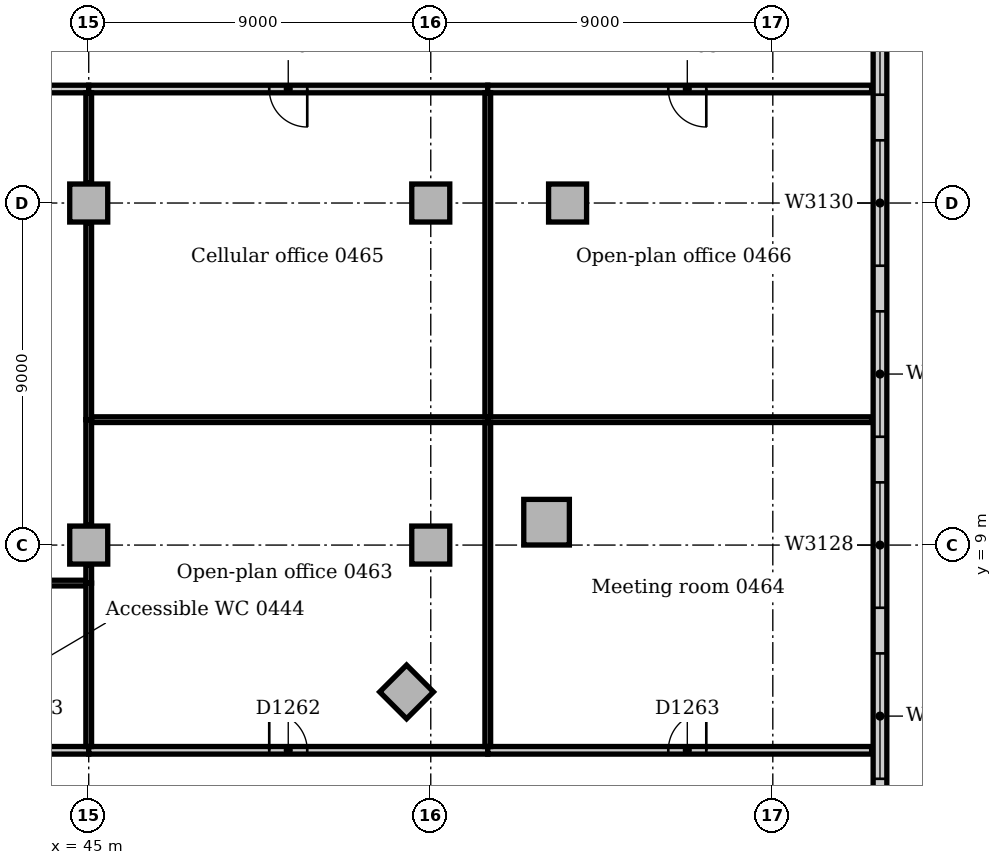
"""IFC4 building model, lengths in metres.
Left out: names, types, materials, properties, quantities, classifications, styles, units other than length and angle.
Written with IfcOpenShell. Run it as: python <this file> out.ifc"""

import sys

from ifc_helpers import new_model, si_unit, direction, frame, frame_2d, origin, origin_2d, place, context, subcontext, project, spatial, rectangle, extrude, element, fill, save


model = new_model("IFC4")
c1 = context("Model", 3, precision=1e-05, world=origin(), true_north=direction((0.0, 1.0)))
c2 = subcontext(c1, "Body", "Model", "MODEL_VIEW")
j1 = project(units=[si_unit("LENGTHUNIT", "METRE"), si_unit("PLANEANGLEUNIT", "RADIAN")], contexts=[c1])
p1 = place(None, origin())
s1 = spatial("IfcSite", under=j1, at=p1, CompositionType="ELEMENT")
p2 = place(p1, origin())
s2 = spatial("IfcBuilding", under=s1, at=p2, CompositionType="ELEMENT")
p3 = place(p2, frame((0.0, 0.0, 21.0)))
s3 = spatial("IfcBuildingStorey", under=s2, at=p3, CompositionType="ELEMENT", Elevation=21.0)
p4 = place(p3, frame((57.047, 9.602, 0.0), z_axis=(0.0, 0.0, 1.0), x_axis=(1.0, 0.0, 0.0)))
e1 = element("IfcColumn", 1, at=p4, inside=s3, PredefinedType="COLUMN", context=c2, shape_type="SweptSolid", body=[
    extrude(rectangle(XDim=1.2, YDim=1.2, at=origin_2d()), origin(), (0.0, 0.0, 1.0), 4.85),
])
for number, where, z_axis, x_axis in (
    (2, (53.364, 5.136, 0.0), (0.0, 0.0, 1.0), (0.707, 0.707, 0.0)),
    (3, (57.6, 18.0, 0.0), (0.0, 0.0, 1.0), (1.0, 0.0, 0.0)),
    (4, (45.0, 9.0, 0.0), (0.0, 0.0, 1.0), (1.0, 0.0, 0.0)),
    (5, (45.0, 18.0, 0.0), (0.0, 0.0, 1.0), (1.0, 0.0, 0.0)),
    (6, (54.0, 9.0, 0.0), (0.0, 0.0, 1.0), (1.0, 0.0, 0.0)),
    (7, (54.0, 18.0, 0.0), (0.0, 0.0, 1.0), (1.0, 0.0, 0.0)),
):
    element("IfcColumn", number, at=place(p3, frame(where, z_axis=z_axis, x_axis=x_axis)), inside=s3, PredefinedType="COLUMN", context=c2, shape_type="SweptSolid", body=[
        extrude(rectangle(XDim=1.0, YDim=1.0, at=origin_2d()), origin(), (0.0, 0.0, 1.0), 4.85),
    ])
p5 = place(p3, frame((65.82, -9.0, 0.0), z_axis=(0.0, 0.0, 1.0), x_axis=(0.0, 1.0, 0.0)))
e8 = element("IfcWall", 8, at=p5, inside=s3, PredefinedType="STANDARD", context=c2, shape_type="SweptSolid", body=[
    extrude(rectangle(XDim=63.0, YDim=0.36, at=frame_2d((31.5, 0.0))), origin(), (0.0, 0.0, 1.0), 4.85),
])
p6 = place(p5, frame((2.85, 0.0, 0.9)))
e9 = element("IfcOpeningElement", 9, at=p6, cuts=e8, PredefinedType="OPENING", context=c2, shape_type="SweptSolid", body=[
    extrude(rectangle(XDim=3.3, YDim=2.4, at=frame_2d((1.65, 1.2))), frame((0.0, 0.19, 0.0), z_axis=(0.0, -1.0, 0.0), x_axis=(1.0, 0.0, 0.0)), (0.0, 0.0, 1.0), 0.38),
])
p7 = place(p5, frame((7.35, 0.0, 0.9)))
e10 = element("IfcOpeningElement", 10, at=p7, cuts=e8, PredefinedType="OPENING", context=c2, shape_type="SweptSolid", body=[
    extrude(rectangle(XDim=3.3, YDim=2.4, at=frame_2d((1.65, 1.2))), frame((0.0, 0.19, 0.0), z_axis=(0.0, -1.0, 0.0), x_axis=(1.0, 0.0, 0.0)), (0.0, 0.0, 1.0), 0.38),
])
p8 = place(p5, frame((11.85, 0.0, 0.9)))
e11 = element("IfcOpeningElement", 11, at=p8, cuts=e8, PredefinedType="OPENING", context=c2, shape_type="SweptSolid", body=[
    extrude(rectangle(XDim=3.3, YDim=2.4, at=frame_2d((1.65, 1.2))), frame((0.0, 0.19, 0.0), z_axis=(0.0, -1.0, 0.0), x_axis=(1.0, 0.0, 0.0)), (0.0, 0.0, 1.0), 0.38),
])
p9 = place(p5, frame((16.35, 0.0, 0.9)))
e12 = element("IfcOpeningElement", 12, at=p9, cuts=e8, PredefinedType="OPENING", context=c2, shape_type="SweptSolid", body=[
    extrude(rectangle(XDim=3.3, YDim=2.4, at=frame_2d((1.65, 1.2))), frame((0.0, 0.19, 0.0), z_axis=(0.0, -1.0, 0.0), x_axis=(1.0, 0.0, 0.0)), (0.0, 0.0, 1.0), 0.38),
])
p10 = place(p5, frame((20.85, 0.0, 0.9)))
e13 = element("IfcOpeningElement", 13, at=p10, cuts=e8, PredefinedType="OPENING", context=c2, shape_type="SweptSolid", body=[
    extrude(rectangle(XDim=3.3, YDim=2.4, at=frame_2d((1.65, 1.2))), frame((0.0, 0.19, 0.0), z_axis=(0.0, -1.0, 0.0), x_axis=(1.0, 0.0, 0.0)), (0.0, 0.0, 1.0), 0.38),
])
p11 = place(p5, frame((25.35, 0.0, 0.9)))
e14 = element("IfcOpeningElement", 14, at=p11, cuts=e8, PredefinedType="OPENING", context=c2, shape_type="SweptSolid", body=[
    extrude(rectangle(XDim=3.3, YDim=2.4, at=frame_2d((1.65, 1.2))), frame((0.0, 0.19, 0.0), z_axis=(0.0, -1.0, 0.0), x_axis=(1.0, 0.0, 0.0)), (0.0, 0.0, 1.0), 0.38),
])
p12 = place(p5, frame((29.85, 0.0, 0.9)))
e15 = element("IfcOpeningElement", 15, at=p12, cuts=e8, PredefinedType="OPENING", context=c2, shape_type="SweptSolid", body=[
    extrude(rectangle(XDim=3.3, YDim=2.4, at=frame_2d((1.65, 1.2))), frame((0.0, 0.19, 0.0), z_axis=(0.0, -1.0, 0.0), x_axis=(1.0, 0.0, 0.0)), (0.0, 0.0, 1.0), 0.38),
])
p13 = place(p5, frame((34.35, 0.0, 0.9)))
e16 = element("IfcOpeningElement", 16, at=p13, cuts=e8, PredefinedType="OPENING", context=c2, shape_type="SweptSolid", body=[
    extrude(rectangle(XDim=3.3, YDim=2.4, at=frame_2d((1.65, 1.2))), frame((0.0, 0.19, 0.0), z_axis=(0.0, -1.0, 0.0), x_axis=(1.0, 0.0, 0.0)), (0.0, 0.0, 1.0), 0.38),
])
p14 = place(p5, frame((38.85, 0.0, 0.9)))
e17 = element("IfcOpeningElement", 17, at=p14, cuts=e8, PredefinedType="OPENING", context=c2, shape_type="SweptSolid", body=[
    extrude(rectangle(XDim=3.3, YDim=2.4, at=frame_2d((1.65, 1.2))), frame((0.0, 0.19, 0.0), z_axis=(0.0, -1.0, 0.0), x_axis=(1.0, 0.0, 0.0)), (0.0, 0.0, 1.0), 0.38),
])
p15 = place(p5, frame((43.35, 0.0, 0.9)))
e18 = element("IfcOpeningElement", 18, at=p15, cuts=e8, PredefinedType="OPENING", context=c2, shape_type="SweptSolid", body=[
    extrude(rectangle(XDim=3.3, YDim=2.4, at=frame_2d((1.65, 1.2))), frame((0.0, 0.19, 0.0), z_axis=(0.0, -1.0, 0.0), x_axis=(1.0, 0.0, 0.0)), (0.0, 0.0, 1.0), 0.38),
])
p16 = place(p5, frame((47.85, 0.0, 0.9)))
e19 = element("IfcOpeningElement", 19, at=p16, cuts=e8, PredefinedType="OPENING", context=c2, shape_type="SweptSolid", body=[
    extrude(rectangle(XDim=3.3, YDim=2.4, at=frame_2d((1.65, 1.2))), frame((0.0, 0.19, 0.0), z_axis=(0.0, -1.0, 0.0), x_axis=(1.0, 0.0, 0.0)), (0.0, 0.0, 1.0), 0.38),
])
p17 = place(p5, frame((52.35, 0.0, 0.9)))
e20 = element("IfcOpeningElement", 20, at=p17, cuts=e8, PredefinedType="OPENING", context=c2, shape_type="SweptSolid", body=[
    extrude(rectangle(XDim=3.3, YDim=2.4, at=frame_2d((1.65, 1.2))), frame((0.0, 0.19, 0.0), z_axis=(0.0, -1.0, 0.0), x_axis=(1.0, 0.0, 0.0)), (0.0, 0.0, 1.0), 0.38),
])
p18 = place(p5, frame((56.85, 0.0, 0.9)))
e21 = element("IfcOpeningElement", 21, at=p18, cuts=e8, PredefinedType="OPENING", context=c2, shape_type="SweptSolid", body=[
    extrude(rectangle(XDim=3.3, YDim=2.4, at=frame_2d((1.65, 1.2))), frame((0.0, 0.19, 0.0), z_axis=(0.0, -1.0, 0.0), x_axis=(1.0, 0.0, 0.0)), (0.0, 0.0, 1.0), 0.38),
])
p19 = place(p3, frame((42.0, 3.6, 0.0), z_axis=(0.0, 0.0, 1.0), x_axis=(1.0, 0.0, 0.0)))
e22 = element("IfcWall", 22, at=p19, inside=s3, PredefinedType="PARTITIONING", context=c2, shape_type="SweptSolid", body=[
    extrude(rectangle(XDim=3.0, YDim=0.2, at=frame_2d((1.5, 0.0))), origin(), (0.0, 0.0, 1.0), 4.85),
])
p20 = place(p19, frame((1.0, 0.0, 0.0)))
e23 = element("IfcOpeningElement", 23, at=p20, cuts=e22, PredefinedType="OPENING", context=c2, shape_type="SweptSolid", body=[
    extrude(rectangle(XDim=1.0, YDim=2.1, at=frame_2d((0.5, 1.05))), frame((0.0, 0.11, 0.0), z_axis=(0.0, -1.0, 0.0), x_axis=(1.0, 0.0, 0.0)), (0.0, 0.0, 1.0), 0.22),
])
p21 = place(p3, frame((45.0, 3.6, 0.0), z_axis=(0.0, 0.0, 1.0), x_axis=(1.0, 0.0, 0.0)))
e24 = element("IfcWall", 24, at=p21, inside=s3, PredefinedType="PARTITIONING", context=c2, shape_type="SweptSolid", body=[
    extrude(rectangle(XDim=10.5, YDim=0.2, at=frame_2d((5.25, 0.0))), origin(), (0.0, 0.0, 1.0), 4.7),
])
p22 = place(p21, frame((4.75, 0.0, 0.0)))
e25 = element("IfcOpeningElement", 25, at=p22, cuts=e24, PredefinedType="OPENING", context=c2, shape_type="SweptSolid", body=[
    extrude(rectangle(XDim=1.0, YDim=2.1, at=frame_2d((0.5, 1.05))), frame((0.0, 0.11, 0.0), z_axis=(0.0, -1.0, 0.0), x_axis=(1.0, 0.0, 0.0)), (0.0, 0.0, 1.0), 0.22),
])
p23 = place(p3, frame((55.5, 3.6, 0.0), z_axis=(0.0, 0.0, 1.0), x_axis=(1.0, 0.0, 0.0)))
e26 = element("IfcWall", 26, at=p23, inside=s3, PredefinedType="PARTITIONING", context=c2, shape_type="SweptSolid", body=[
    extrude(rectangle(XDim=10.1, YDim=0.2, at=frame_2d((5.05, 0.0))), origin(), (0.0, 0.0, 1.0), 4.7),
])
p24 = place(p23, frame((4.75, 0.0, 0.0)))
e27 = element("IfcOpeningElement", 27, at=p24, cuts=e26, PredefinedType="OPENING", context=c2, shape_type="SweptSolid", body=[
    extrude(rectangle(XDim=1.0, YDim=2.1, at=frame_2d((0.5, 1.05))), frame((0.0, 0.11, 0.0), z_axis=(0.0, -1.0, 0.0), x_axis=(1.0, 0.0, 0.0)), (0.0, 0.0, 1.0), 0.22),
])
p25 = place(p3, frame((36.0, 21.0, 0.0), z_axis=(0.0, 0.0, 1.0), x_axis=(1.0, 0.0, 0.0)))
e28 = element("IfcWall", 28, at=p25, inside=s3, PredefinedType="PARTITIONING", context=c2, shape_type="SweptSolid", body=[
    extrude(rectangle(XDim=9.0, YDim=0.2, at=frame_2d((4.5, 0.0))), origin(), (0.0, 0.0, 1.0), 4.85),
])
p26 = place(p25, frame((0.3, 0.0, 0.0)))
e29 = element("IfcOpeningElement", 29, at=p26, cuts=e28, PredefinedType="OPENING", context=c2, shape_type="SweptSolid", body=[
    extrude(rectangle(XDim=1.8, YDim=2.1, at=frame_2d((0.9, 1.05))), frame((0.0, 0.11, 0.0), z_axis=(0.0, -1.0, 0.0), x_axis=(1.0, 0.0, 0.0)), (0.0, 0.0, 1.0), 0.22),
])
p27 = place(p3, frame((45.0, 21.0, 0.0), z_axis=(0.0, 0.0, 1.0), x_axis=(1.0, 0.0, 0.0)))
e30 = element("IfcWall", 30, at=p27, inside=s3, PredefinedType="PARTITIONING", context=c2, shape_type="SweptSolid", body=[
    extrude(rectangle(XDim=10.5, YDim=0.2, at=frame_2d((5.25, 0.0))), origin(), (0.0, 0.0, 1.0), 4.85),
])
p28 = place(p27, frame((4.75, 0.0, 0.0)))
e31 = element("IfcOpeningElement", 31, at=p28, cuts=e30, PredefinedType="OPENING", context=c2, shape_type="SweptSolid", body=[
    extrude(rectangle(XDim=1.0, YDim=2.1, at=frame_2d((0.5, 1.05))), frame((0.0, 0.11, 0.0), z_axis=(0.0, -1.0, 0.0), x_axis=(1.0, 0.0, 0.0)), (0.0, 0.0, 1.0), 0.22),
])
p29 = place(p3, frame((55.5, 21.0, 0.0), z_axis=(0.0, 0.0, 1.0), x_axis=(1.0, 0.0, 0.0)))
e32 = element("IfcWall", 32, at=p29, inside=s3, PredefinedType="PARTITIONING", context=c2, shape_type="SweptSolid", body=[
    extrude(rectangle(XDim=10.1, YDim=0.2, at=frame_2d((5.05, 0.0))), origin(), (0.0, 0.0, 1.0), 4.7),
])
p30 = place(p29, frame((4.75, 0.0, 0.0)))
e33 = element("IfcOpeningElement", 33, at=p30, cuts=e32, PredefinedType="OPENING", context=c2, shape_type="SweptSolid", body=[
    extrude(rectangle(XDim=1.0, YDim=2.1, at=frame_2d((0.5, 1.05))), frame((0.0, 0.11, 0.0), z_axis=(0.0, -1.0, 0.0), x_axis=(1.0, 0.0, 0.0)), (0.0, 0.0, 1.0), 0.22),
])
p31 = place(p3, frame((42.0, 8.0, 0.0), z_axis=(0.0, 0.0, 1.0), x_axis=(1.0, 0.0, 0.0)))
e34 = element("IfcWall", 34, at=p31, inside=s3, PredefinedType="PARTITIONING", context=c2, shape_type="SweptSolid", body=[
    extrude(rectangle(XDim=2.925, YDim=0.15, at=frame_2d((1.462, 0.0))), origin(), (0.0, 0.0, 1.0), 4.85),
])
p32 = place(p3, frame((45.0, 8.0, 0.0), z_axis=(0.0, 0.0, 1.0), x_axis=(0.0, 1.0, 0.0)))
e35 = element("IfcWall", 35, at=p32, inside=s3, PredefinedType="PARTITIONING", context=c2, shape_type="SweptSolid", body=[
    extrude(rectangle(XDim=0.48, YDim=0.15, at=frame_2d((0.24, 0.0))), origin(), (0.0, 0.0, 1.0), 4.85),
])
p33 = place(p3, frame((45.0, 9.52, 0.0), z_axis=(0.0, 0.0, 1.0), x_axis=(0.0, 1.0, 0.0)))
e36 = element("IfcWall", 36, at=p33, inside=s3, PredefinedType="PARTITIONING", context=c2, shape_type="SweptSolid", body=[
    extrude(rectangle(XDim=2.78, YDim=0.15, at=frame_2d((1.39, 0.0))), origin(), (0.0, 0.0, 1.0), 4.158),
])
p34 = place(p3, frame((45.0, 12.3, 0.0), z_axis=(0.0, 0.0, 1.0), x_axis=(0.0, 1.0, 0.0)))
e37 = element("IfcWall", 37, at=p34, inside=s3, PredefinedType="PARTITIONING", context=c2, shape_type="SweptSolid", body=[
    extrude(rectangle(XDim=5.18, YDim=0.15, at=frame_2d((2.59, 0.0))), origin(), (0.0, 0.0, 1.0), 4.158),
])
p35 = place(p3, frame((45.0, 18.52, 0.0), z_axis=(0.0, 0.0, 1.0), x_axis=(0.0, 1.0, 0.0)))
e38 = element("IfcWall", 38, at=p35, inside=s3, PredefinedType="PARTITIONING", context=c2, shape_type="SweptSolid", body=[
    extrude(rectangle(XDim=2.38, YDim=0.15, at=frame_2d((1.19, 0.0))), origin(), (0.0, 0.0, 1.0), 4.158),
])
p36 = place(p3, frame((45.0, 3.7, 0.0), z_axis=(0.0, 0.0, 1.0), x_axis=(0.0, 1.0, 0.0)))
e39 = element("IfcWall", 39, at=p36, inside=s3, PredefinedType="PARTITIONING", context=c2, shape_type="SweptSolid", body=[
    extrude(rectangle(XDim=4.3, YDim=0.15, at=frame_2d((2.15, 0.0))), origin(), (0.0, 0.0, 1.0), 4.158),
])
p37 = place(p3, frame((55.5, 3.7, 0.0), z_axis=(0.0, 0.0, 1.0), x_axis=(0.0, 1.0, 0.0)))
e40 = element("IfcWall", 40, at=p37, inside=s3, PredefinedType="PARTITIONING", context=c2, shape_type="SweptSolid", body=[
    extrude(rectangle(XDim=8.525, YDim=0.15, at=frame_2d((4.263, 0.0))), origin(), (0.0, 0.0, 1.0), 4.7),
])
p38 = place(p3, frame((45.075, 12.3, 0.0), z_axis=(0.0, 0.0, 1.0), x_axis=(1.0, 0.0, 0.0)))
e41 = element("IfcWall", 41, at=p38, inside=s3, PredefinedType="PARTITIONING", context=c2, shape_type="SweptSolid", body=[
    extrude(rectangle(XDim=10.425, YDim=0.15, at=frame_2d((5.213, 0.0))), origin(), (0.0, 0.0, 1.0), 4.85),
])
p39 = place(p3, frame((55.5, 12.3, 0.0), z_axis=(0.0, 0.0, 1.0), x_axis=(1.0, 0.0, 0.0)))
e42 = element("IfcWall", 42, at=p39, inside=s3, PredefinedType="PARTITIONING", context=c2, shape_type="SweptSolid", body=[
    extrude(rectangle(XDim=10.1, YDim=0.15, at=frame_2d((5.05, 0.0))), origin(), (0.0, 0.0, 1.0), 4.7),
])
p40 = place(p3, frame((55.5, 12.375, 0.0), z_axis=(0.0, 0.0, 1.0), x_axis=(0.0, 1.0, 0.0)))
e43 = element("IfcWall", 43, at=p40, inside=s3, PredefinedType="PARTITIONING", context=c2, shape_type="SweptSolid", body=[
    extrude(rectangle(XDim=8.525, YDim=0.15, at=frame_2d((4.263, 0.0))), origin(), (0.0, 0.0, 1.0), 4.85),
])
p41 = place(p8, origin())
e44 = element("IfcWindow", 44, at=p41, inside=s3, PartitioningType="SINGLE_PANEL", PredefinedType="WINDOW", context=c2, shape_type="SweptSolid", body=[
    extrude(rectangle(XDim=3.3, YDim=2.4, at=frame_2d((1.65, 1.2))), frame((0.0, 0.13, 0.0), z_axis=(0.0, -1.0, 0.0), x_axis=(1.0, 0.0, 0.0)), (0.0, 0.0, 1.0), 0.06),
])
fill(e11, e44)
p42 = place(p9, origin())
e45 = element("IfcWindow", 45, at=p42, inside=s3, PartitioningType="SINGLE_PANEL", PredefinedType="WINDOW", context=c2, shape_type="SweptSolid", body=[
    extrude(rectangle(XDim=3.3, YDim=2.4, at=frame_2d((1.65, 1.2))), frame((0.0, 0.13, 0.0), z_axis=(0.0, -1.0, 0.0), x_axis=(1.0, 0.0, 0.0)), (0.0, 0.0, 1.0), 0.06),
])
fill(e12, e45)
p43 = place(p10, origin())
e46 = element("IfcWindow", 46, at=p43, inside=s3, PartitioningType="SINGLE_PANEL", PredefinedType="WINDOW", context=c2, shape_type="SweptSolid", body=[
    extrude(rectangle(XDim=3.3, YDim=2.4, at=frame_2d((1.65, 1.2))), frame((0.0, 0.13, 0.0), z_axis=(0.0, -1.0, 0.0), x_axis=(1.0, 0.0, 0.0)), (0.0, 0.0, 1.0), 0.06),
])
fill(e13, e46)
p44 = place(p11, origin())
e47 = element("IfcWindow", 47, at=p44, inside=s3, PartitioningType="SINGLE_PANEL", PredefinedType="WINDOW", context=c2, shape_type="SweptSolid", body=[
    extrude(rectangle(XDim=3.3, YDim=2.4, at=frame_2d((1.65, 1.2))), frame((0.0, 0.13, 0.0), z_axis=(0.0, -1.0, 0.0), x_axis=(1.0, 0.0, 0.0)), (0.0, 0.0, 1.0), 0.06),
])
fill(e14, e47)
p45 = place(p12, origin())
e48 = element("IfcWindow", 48, at=p45, inside=s3, PartitioningType="SINGLE_PANEL", PredefinedType="WINDOW", context=c2, shape_type="SweptSolid", body=[
    extrude(rectangle(XDim=3.3, YDim=2.4, at=frame_2d((1.65, 1.2))), frame((0.0, 0.13, 0.0), z_axis=(0.0, -1.0, 0.0), x_axis=(1.0, 0.0, 0.0)), (0.0, 0.0, 1.0), 0.06),
])
fill(e15, e48)
p46 = place(p22, origin())
e49 = element("IfcDoor", 49, at=p46, inside=s3, OperationType="SINGLE_SWING_LEFT", PredefinedType="DOOR", context=c2, shape_type="SweptSolid", body=[
    extrude(rectangle(XDim=1.0, YDim=2.1, at=frame_2d((0.5, 1.05))), frame((0.0, 0.025, 0.0), z_axis=(0.0, -1.0, 0.0), x_axis=(1.0, 0.0, 0.0)), (0.0, 0.0, 1.0), 0.05),
])
fill(e25, e49)
p47 = place(p24, origin())
e50 = element("IfcDoor", 50, at=p47, inside=s3, OperationType="SINGLE_SWING_RIGHT", PredefinedType="DOOR", context=c2, shape_type="SweptSolid", body=[
    extrude(rectangle(XDim=1.0, YDim=2.1, at=frame_2d((0.5, 1.05))), frame((0.0, 0.025, 0.0), z_axis=(0.0, -1.0, 0.0), x_axis=(1.0, 0.0, 0.0)), (0.0, 0.0, 1.0), 0.05),
])
fill(e27, e50)
p48 = place(p28, frame((1.0, 0.0, 0.0), z_axis=(0.0, 0.0, 1.0), x_axis=(-1.0, 0.0, 0.0)))
e51 = element("IfcDoor", 51, at=p48, inside=s3, OperationType="SINGLE_SWING_LEFT", PredefinedType="DOOR", context=c2, shape_type="SweptSolid", body=[
    extrude(rectangle(XDim=1.0, YDim=2.1, at=frame_2d((0.5, 1.05))), frame((0.0, 0.025, 0.0), z_axis=(0.0, -1.0, 0.0), x_axis=(1.0, 0.0, 0.0)), (0.0, 0.0, 1.0), 0.05),
])
fill(e31, e51)
p49 = place(p30, frame((1.0, 0.0, 0.0), z_axis=(0.0, 0.0, 1.0), x_axis=(-1.0, 0.0, 0.0)))
e52 = element("IfcDoor", 52, at=p49, inside=s3, OperationType="SINGLE_SWING_LEFT", PredefinedType="DOOR", context=c2, shape_type="SweptSolid", body=[
    extrude(rectangle(XDim=1.0, YDim=2.1, at=frame_2d((0.5, 1.05))), frame((0.0, 0.025, 0.0), z_axis=(0.0, -1.0, 0.0), x_axis=(1.0, 0.0, 0.0)), (0.0, 0.0, 1.0), 0.05),
])
fill(e33, e52)
save(model, sys.argv[1])
